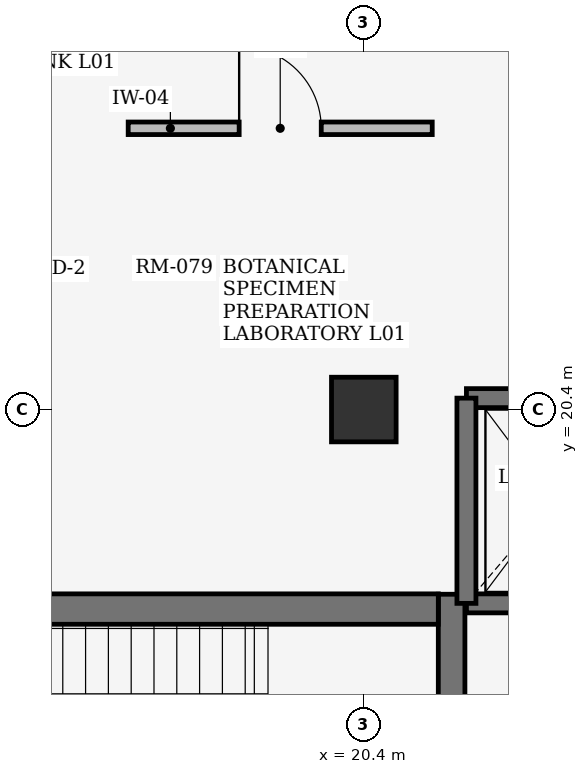
"""IFC4 building model, lengths in metres.
Left out: names, types, materials, properties, quantities, classifications, styles, units other than length and angle.
Written with IfcOpenShell. Run it as: python <this file> out.ifc"""

import sys

from ifc_helpers import new_model, si_unit, direction, frame, frame_2d, origin, origin_2d, place, context, subcontext, project, spatial, rectangle, extrude, element, fill, save


model = new_model("IFC4")
c1 = context("Model", 3, precision=1e-05, world=origin(), true_north=direction((0.0, 1.0)))
c2 = subcontext(c1, "Body", "Model", "MODEL_VIEW")
j1 = project(units=[si_unit("LENGTHUNIT", "METRE"), si_unit("PLANEANGLEUNIT", "RADIAN")], contexts=[c1])
p1 = place(None, origin())
s1 = spatial("IfcSite", under=j1, at=p1, CompositionType="ELEMENT")
p2 = place(p1, origin())
s2 = spatial("IfcBuilding", under=s1, at=p2, CompositionType="ELEMENT")
p3 = place(p2, frame((0.0, 0.0, 4.8)))
s3 = spatial("IfcBuildingStorey", under=s2, at=p3, CompositionType="ELEMENT", Elevation=4.8)
p4 = place(p3, frame((20.4, 20.4, 0.0), z_axis=(0.0, 0.0, 1.0), x_axis=(1.0, 0.0, 0.0)))
e1 = element("IfcColumn", 1, at=p4, inside=s3, PredefinedType="COLUMN", context=c2, shape_type="SweptSolid", body=[
    extrude(rectangle(XDim=0.85, YDim=0.85, at=origin_2d()), origin(), (0.0, 0.0, 1.0), 3.95),
])
p5 = place(p3, frame((21.555, 13.38, 0.0), z_axis=(0.0, 0.0, 1.0), x_axis=(0.0, 1.0, 0.0)))
e2 = element("IfcWall", 2, at=p5, inside=s3, PredefinedType="SHEAR", context=c2, shape_type="SweptSolid", body=[
    extrude(rectangle(XDim=4.59, YDim=0.35, at=frame_2d((2.295, 0.0))), origin(), (0.0, 0.0, 1.0), 3.95),
])
p6 = place(p3, frame((13.4, 17.775, 0.0), z_axis=(0.0, 0.0, 1.0), x_axis=(1.0, 0.0, 0.0)))
e3 = element("IfcWall", 3, at=p6, inside=s3, PredefinedType="SHEAR", context=c2, shape_type="SweptSolid", body=[
    extrude(rectangle(XDim=7.98, YDim=0.4, at=frame_2d((3.99, 0.0))), origin(), (0.0, 0.0, 1.0), 3.95),
])
p7 = place(p3, frame((21.75, 17.85, 0.0), z_axis=(0.0, 0.0, 1.0), x_axis=(1.0, 0.0, 0.0)))
e4 = element("IfcWall", 4, at=p7, inside=s3, PredefinedType="SHEAR", context=c2, shape_type="SweptSolid", body=[
    extrude(rectangle(XDim=2.3, YDim=0.25, at=frame_2d((1.15, 0.0))), origin(), (0.0, 0.0, 1.0), 3.95),
])
p8 = place(p7, frame((0.6, 0.0, 0.0)))
e5 = element("IfcOpeningElement", 5, at=p8, cuts=e4, PredefinedType="OPENING", context=c2, shape_type="SweptSolid", body=[
    extrude(rectangle(XDim=1.1, YDim=2.2, at=frame_2d((0.55, 1.1))), frame((0.0, 0.135, 0.0), z_axis=(0.0, -1.0, 0.0), x_axis=(1.0, 0.0, 0.0)), (0.0, 0.0, 1.0), 0.27),
])
p9 = place(p3, frame((21.75, 20.55, 0.0), z_axis=(0.0, 0.0, 1.0), x_axis=(1.0, 0.0, 0.0)))
e6 = element("IfcWall", 6, at=p9, inside=s3, PredefinedType="SHEAR", context=c2, shape_type="SweptSolid", body=[
    extrude(rectangle(XDim=2.3, YDim=0.25, at=frame_2d((1.15, 0.0))), origin(), (0.0, 0.0, 1.0), 3.95),
])
p10 = place(p3, frame((21.75, 17.85, 0.0), z_axis=(0.0, 0.0, 1.0), x_axis=(0.0, 1.0, 0.0)))
e7 = element("IfcWall", 7, at=p10, inside=s3, PredefinedType="SHEAR", context=c2, shape_type="SweptSolid", body=[
    extrude(rectangle(XDim=2.7, YDim=0.25, at=frame_2d((1.35, 0.0))), origin(), (0.0, 0.0, 1.0), 3.95),
])
p11 = place(p3, frame((17.3, 24.1, 0.0), z_axis=(0.0, 0.0, 1.0), x_axis=(1.0, 0.0, 0.0)))
e8 = element("IfcWall", 8, at=p11, inside=s3, PredefinedType="PARTITIONING", context=c2, shape_type="SweptSolid", body=[
    extrude(rectangle(XDim=4.0, YDim=0.165, at=frame_2d((2.0, 0.0))), origin(), (0.0, 0.0, 1.0), 3.93),
])
p12 = place(p11, frame((1.46, 0.0, 0.0)))
e9 = element("IfcOpeningElement", 9, at=p12, cuts=e8, PredefinedType="OPENING", context=c2, shape_type="SweptSolid", body=[
    extrude(rectangle(XDim=1.08, YDim=2.1, at=frame_2d((0.54, 1.05))), frame((0.0, 0.093, 0.0), z_axis=(0.0, -1.0, 0.0), x_axis=(1.0, 0.0, 0.0)), (0.0, 0.0, 1.0), 0.185),
])
p13 = place(p12, origin())
e10 = element("IfcDoor", 10, at=p13, inside=s3, OperationType="SINGLE_SWING_LEFT", PredefinedType="DOOR", context=c2, shape_type="SweptSolid", body=[
    extrude(rectangle(XDim=1.08, YDim=2.1, at=frame_2d((0.54, 1.05))), frame((0.0, 0.025, 0.0), z_axis=(0.0, -1.0, 0.0), x_axis=(1.0, 0.0, 0.0)), (0.0, 0.0, 1.0), 0.05),
])
fill(e9, e10)
save(model, sys.argv[1])
